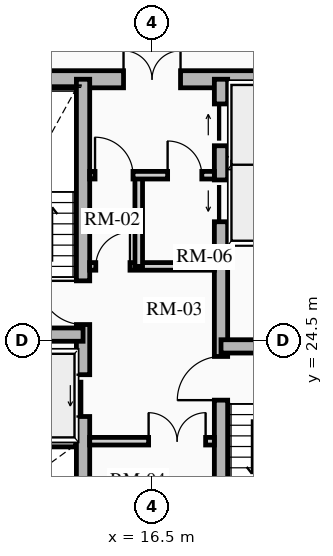
"""IFC4 building model, lengths in metres.
Left out: names, types, materials, properties, quantities, classifications, styles, units other than length and angle.
Written with IfcOpenShell. Run it as: python <this file> out.ifc"""

import sys

from ifc_helpers import new_model, si_unit, direction, frame, frame_2d, origin, place, context, subcontext, project, spatial, rectangle, extrude, source, transform, mapped, element, fill, save


model = new_model("IFC4")
c1 = context("Model", 3, precision=1e-05, world=origin(), true_north=direction((0.0, 1.0)))
c2 = subcontext(c1, "Body", "Model", "MODEL_VIEW")
j1 = project(units=[si_unit("LENGTHUNIT", "METRE"), si_unit("PLANEANGLEUNIT", "RADIAN")], contexts=[c1])
p1 = place(None, origin())
s1 = spatial("IfcSite", under=j1, at=p1, CompositionType="ELEMENT")
p2 = place(p1, origin())
s2 = spatial("IfcBuilding", under=s1, at=p2, CompositionType="ELEMENT")
p3 = place(p2, frame((0.0, 0.0, 113.8)))
s3 = spatial("IfcBuildingStorey", under=s2, at=p3, CompositionType="ELEMENT", Elevation=113.8)
p4 = place(p3, frame((11.15, 31.375, 0.0), z_axis=(0.0, 0.0, 1.0), x_axis=(1.0, 0.0, 0.0)))
e1 = element("IfcWall", 1, at=p4, inside=s3, PredefinedType="SHEAR", context=c2, shape_type="SweptSolid", body=[
    extrude(rectangle(XDim=10.7, YDim=0.45, at=frame_2d((5.35, 0.0))), origin(), (0.0, 0.0, 1.0), 2.91),
])
m1 = source(origin(), c2, "Body", "SweptSolid", [
    extrude(rectangle(XDim=1.5, YDim=2.02, at=frame_2d((0.75, 1.01))), frame((0.0, 0.235, 0.0), z_axis=(0.0, -1.0, 0.0), x_axis=(1.0, 0.0, 0.0)), (0.0, 0.0, 1.0), 0.47),
])
p5 = place(p4, frame((4.6, 0.0, 0.0)))
e2 = element("IfcOpeningElement", 2, at=p5, cuts=e1, PredefinedType="OPENING", context=c2, shape_type="MappedRepresentation", body=[
    mapped(m1, transform((0.0, 0.0, 0.0), x_axis=(1.0, 0.0, 0.0), y_axis=(0.0, 1.0, 0.0), z_axis=(0.0, 0.0, 1.0), scale=1.0)),
])
p6 = place(p3, frame((14.685, 17.625, 0.0), z_axis=(0.0, 0.0, 1.0), x_axis=(0.0, 1.0, 0.0)))
e3 = element("IfcWall", 3, at=p6, inside=s3, PredefinedType="SHEAR", context=c2, shape_type="SweptSolid", body=[
    extrude(rectangle(XDim=13.75, YDim=0.35, at=frame_2d((6.875, 0.0))), origin(), (0.0, 0.0, 1.0), 2.91),
])
m2 = source(origin(), c2, "Body", "SweptSolid", [
    extrude(rectangle(XDim=1.1, YDim=2.015, at=frame_2d((0.55, 1.007))), frame((0.0, 0.185, 0.0), z_axis=(0.0, -1.0, 0.0), x_axis=(1.0, 0.0, 0.0)), (0.0, 0.0, 1.0), 0.37),
])
p7 = place(p6, frame((4.875, 0.0, 0.0)))
e4 = element("IfcOpeningElement", 4, at=p7, cuts=e3, PredefinedType="OPENING", context=c2, shape_type="MappedRepresentation", body=[
    mapped(m2, transform((0.0, 0.0, 0.0), x_axis=(1.0, 0.0, 0.0), y_axis=(0.0, 1.0, 0.0), z_axis=(0.0, 0.0, 1.0), scale=1.0)),
])
m3 = source(origin(), c2, "Body", "SweptSolid", [
    extrude(rectangle(XDim=1.15, YDim=2.02, at=frame_2d((0.575, 1.01))), frame((0.0, 0.185, 0.0), z_axis=(0.0, -1.0, 0.0), x_axis=(1.0, 0.0, 0.0)), (0.0, 0.0, 1.0), 0.37),
])
p8 = place(p6, frame((7.295, 0.0, 0.0)))
e5 = element("IfcOpeningElement", 5, at=p8, cuts=e3, PredefinedType="OPENING", context=c2, shape_type="MappedRepresentation", body=[
    mapped(m3, transform((0.0, 0.0, 0.0), x_axis=(1.0, 0.0, 0.0), y_axis=(0.0, 1.0, 0.0), z_axis=(0.0, 0.0, 1.0), scale=1.0)),
])
p9 = place(p3, frame((18.315, 17.625, 0.0), z_axis=(0.0, 0.0, 1.0), x_axis=(0.0, 1.0, 0.0)))
e6 = element("IfcWall", 6, at=p9, inside=s3, PredefinedType="SHEAR", context=c2, shape_type="SweptSolid", body=[
    extrude(rectangle(XDim=13.75, YDim=0.35, at=frame_2d((6.875, 0.0))), origin(), (0.0, 0.0, 1.0), 2.91),
])
p10 = place(p9, frame((10.0, 0.0, 0.0)))
e7 = element("IfcOpeningElement", 7, at=p10, cuts=e6, PredefinedType="OPENING", context=c2, shape_type="MappedRepresentation", body=[
    mapped(m2, transform((0.0, 0.0, 0.0), x_axis=(1.0, 0.0, 0.0), y_axis=(0.0, 1.0, 0.0), z_axis=(0.0, 0.0, 1.0), scale=1.0)),
])
p11 = place(p9, frame((12.0, 0.0, 0.0)))
e8 = element("IfcOpeningElement", 8, at=p11, cuts=e6, PredefinedType="OPENING", context=c2, shape_type="MappedRepresentation", body=[
    mapped(m2, transform((0.0, 0.0, 0.0), x_axis=(1.0, 0.0, 0.0), y_axis=(0.0, 1.0, 0.0), z_axis=(0.0, 0.0, 1.0), scale=1.0)),
])
p12 = place(p9, frame((5.305, 0.0, 0.0)))
e9 = element("IfcOpeningElement", 9, at=p12, cuts=e6, PredefinedType="OPENING", context=c2, shape_type="MappedRepresentation", body=[
    mapped(m3, transform((0.0, 0.0, 0.0), x_axis=(1.0, 0.0, 0.0), y_axis=(0.0, 1.0, 0.0), z_axis=(0.0, 0.0, 1.0), scale=1.0)),
])
for number, where, z_axis, x_axis in (
    (10, (11.4, 24.655, 0.0), (0.0, 0.0, 1.0), (1.0, 0.0, 0.0)),
    (11, (18.315, 24.345, 0.0), (0.0, 0.0, 1.0), (1.0, 0.0, 0.0)),
):
    element("IfcWall", number, at=place(p3, frame(where, z_axis=z_axis, x_axis=x_axis)), inside=s3, PredefinedType="SHEAR", context=c2, shape_type="SweptSolid", body=[
        extrude(rectangle(XDim=3.285, YDim=0.35, at=frame_2d((1.643, 0.0))), origin(), (0.0, 0.0, 1.0), 2.91),
    ])
for number, where, z_axis, x_axis in (
    (12, (11.52, 21.8, 0.0), (0.0, 0.0, 1.0), (1.0, 0.0, 0.0)),
    (13, (18.51, 27.13, 0.0), (0.0, 0.0, 1.0), (1.0, 0.0, 0.0)),
    (14, (18.51, 29.175, 0.0), (0.0, 0.0, 1.0), (1.0, 0.0, 0.0)),
):
    element("IfcWall", number, at=place(p3, frame(where, z_axis=z_axis, x_axis=x_axis)), inside=s3, PredefinedType="SHEAR", context=c2, shape_type="SweptSolid", body=[
        extrude(rectangle(XDim=2.97, YDim=0.2, at=frame_2d((1.485, 0.0))), origin(), (0.0, 0.0, 1.0), 2.91),
    ])
p13 = place(p3, frame((14.86, 21.85, 0.0), z_axis=(0.0, 0.0, 1.0), x_axis=(1.0, 0.0, 0.0)))
e15 = element("IfcWall", 15, at=p13, inside=s3, PredefinedType="PARTITIONING", context=c2, shape_type="SweptSolid", body=[
    extrude(rectangle(XDim=3.28, YDim=0.2, at=frame_2d((1.64, 0.0))), origin(), (0.0, 0.0, 1.0), 2.655),
])
m4 = source(origin(), c2, "Body", "SweptSolid", [
    extrude(rectangle(XDim=1.5, YDim=2.02, at=frame_2d((0.75, 1.01))), frame((0.0, 0.11, 0.0), z_axis=(0.0, -1.0, 0.0), x_axis=(1.0, 0.0, 0.0)), (0.0, 0.0, 1.0), 0.22),
])
p14 = place(p13, frame((1.55, 0.0, 0.0)))
e16 = element("IfcOpeningElement", 16, at=p14, cuts=e15, PredefinedType="OPENING", context=c2, shape_type="MappedRepresentation", body=[
    mapped(m4, transform((0.0, 0.0, 0.0), x_axis=(1.0, 0.0, 0.0), y_axis=(0.0, 1.0, 0.0), z_axis=(0.0, 0.0, 1.0), scale=1.0)),
])
p15 = place(p3, frame((14.86, 26.45, 0.0), z_axis=(0.0, 0.0, 1.0), x_axis=(1.0, 0.0, 0.0)))
e17 = element("IfcWall", 17, at=p15, inside=s3, PredefinedType="PARTITIONING", context=c2, shape_type="SweptSolid", body=[
    extrude(rectangle(XDim=3.28, YDim=0.2, at=frame_2d((1.64, 0.0))), origin(), (0.0, 0.0, 1.0), 2.655),
])
m5 = source(origin(), c2, "Body", "SweptSolid", [
    extrude(rectangle(XDim=0.9, YDim=2.005, at=frame_2d((0.45, 1.002))), frame((0.0, 0.11, 0.0), z_axis=(0.0, -1.0, 0.0), x_axis=(1.0, 0.0, 0.0)), (0.0, 0.0, 1.0), 0.22),
])
p16 = place(p15, frame((0.16, 0.0, 0.0)))
e18 = element("IfcOpeningElement", 18, at=p16, cuts=e17, PredefinedType="OPENING", context=c2, shape_type="MappedRepresentation", body=[
    mapped(m5, transform((0.0, 0.0, 0.0), x_axis=(1.0, 0.0, 0.0), y_axis=(0.0, 1.0, 0.0), z_axis=(0.0, 0.0, 1.0), scale=1.0)),
])
p17 = place(p3, frame((16.15, 26.45, 0.0), z_axis=(0.0, 0.0, 1.0), x_axis=(0.0, 1.0, 0.0)))
e19 = element("IfcWall", 19, at=p17, inside=s3, PredefinedType="PARTITIONING", context=c2, shape_type="SweptSolid", body=[
    extrude(rectangle(XDim=2.4, YDim=0.2, at=frame_2d((1.2, 0.0))), origin(), (0.0, 0.0, 1.0), 2.655),
])
p18 = place(p3, frame((14.86, 28.85, 0.0), z_axis=(0.0, 0.0, 1.0), x_axis=(1.0, 0.0, 0.0)))
e20 = element("IfcWall", 20, at=p18, inside=s3, PredefinedType="PARTITIONING", context=c2, shape_type="SweptSolid", body=[
    extrude(rectangle(XDim=3.28, YDim=0.2, at=frame_2d((1.64, 0.0))), origin(), (0.0, 0.0, 1.0), 2.655),
])
m6 = source(origin(), c2, "Body", "SweptSolid", [
    extrude(rectangle(XDim=1.0, YDim=2.015, at=frame_2d((0.5, 1.007))), frame((0.0, 0.11, 0.0), z_axis=(0.0, -1.0, 0.0), x_axis=(1.0, 0.0, 0.0)), (0.0, 0.0, 1.0), 0.22),
])
p19 = place(p18, frame((0.14, 0.0, 0.0)))
e21 = element("IfcOpeningElement", 21, at=p19, cuts=e20, PredefinedType="OPENING", context=c2, shape_type="MappedRepresentation", body=[
    mapped(m6, transform((0.0, 0.0, 0.0), x_axis=(1.0, 0.0, 0.0), y_axis=(0.0, 1.0, 0.0), z_axis=(0.0, 0.0, 1.0), scale=1.0)),
])
p20 = place(p18, frame((2.05, 0.0, 0.0)))
e22 = element("IfcOpeningElement", 22, at=p20, cuts=e20, PredefinedType="OPENING", context=c2, shape_type="MappedRepresentation", body=[
    mapped(m5, transform((0.0, 0.0, 0.0), x_axis=(1.0, 0.0, 0.0), y_axis=(0.0, 1.0, 0.0), z_axis=(0.0, 0.0, 1.0), scale=1.0)),
])
m7 = source(origin(), c2, "Body", "SweptSolid", [
    extrude(rectangle(XDim=1.1, YDim=2.015, at=frame_2d((0.55, 1.007))), frame((0.0, 0.025, 0.0), z_axis=(0.0, -1.0, 0.0), x_axis=(1.0, 0.0, 0.0)), (0.0, 0.0, 1.0), 0.05),
])
p21 = place(p7, origin())
e23 = element("IfcDoor", 23, at=p21, inside=s3, OperationType="SLIDING_TO_LEFT", PredefinedType="DOOR", context=c2, shape_type="MappedRepresentation", body=[
    mapped(m7, transform((0.0, 0.0, 0.0), x_axis=(1.0, 0.0, 0.0), y_axis=(0.0, 1.0, 0.0), z_axis=(0.0, 0.0, 1.0), scale=1.0)),
])
fill(e4, e23)
p22 = place(p10, origin())
e24 = element("IfcDoor", 24, at=p22, inside=s3, OperationType="SLIDING_TO_LEFT", PredefinedType="DOOR", context=c2, shape_type="MappedRepresentation", body=[
    mapped(m7, transform((0.0, 0.0, 0.0), x_axis=(1.0, 0.0, 0.0), y_axis=(0.0, 1.0, 0.0), z_axis=(0.0, 0.0, 1.0), scale=1.0)),
])
fill(e7, e24)
p23 = place(p11, origin())
e25 = element("IfcDoor", 25, at=p23, inside=s3, OperationType="SLIDING_TO_RIGHT", PredefinedType="DOOR", context=c2, shape_type="MappedRepresentation", body=[
    mapped(m7, transform((0.0, 0.0, 0.0), x_axis=(1.0, 0.0, 0.0), y_axis=(0.0, 1.0, 0.0), z_axis=(0.0, 0.0, 1.0), scale=1.0)),
])
fill(e8, e25)
m8 = source(origin(), c2, "Body", "SweptSolid", [
    extrude(rectangle(XDim=1.15, YDim=2.02, at=frame_2d((0.575, 1.01))), frame((0.0, 0.025, 0.0), z_axis=(0.0, -1.0, 0.0), x_axis=(1.0, 0.0, 0.0)), (0.0, 0.0, 1.0), 0.05),
])
p24 = place(p8, origin())
e26 = element("IfcDoor", 26, at=p24, inside=s3, OperationType="SINGLE_SWING_RIGHT", PredefinedType="DOOR", context=c2, shape_type="MappedRepresentation", body=[
    mapped(m8, transform((0.0, 0.0, 0.0), x_axis=(1.0, 0.0, 0.0), y_axis=(0.0, 1.0, 0.0), z_axis=(0.0, 0.0, 1.0), scale=1.0)),
])
fill(e5, e26)
p25 = place(p12, origin())
e27 = element("IfcDoor", 27, at=p25, inside=s3, OperationType="SINGLE_SWING_LEFT", PredefinedType="DOOR", context=c2, shape_type="MappedRepresentation", body=[
    mapped(m8, transform((0.0, 0.0, 0.0), x_axis=(1.0, 0.0, 0.0), y_axis=(0.0, 1.0, 0.0), z_axis=(0.0, 0.0, 1.0), scale=1.0)),
])
fill(e9, e27)
m9 = source(origin(), c2, "Body", "SweptSolid", [
    extrude(rectangle(XDim=1.5, YDim=2.02, at=frame_2d((0.75, 1.01))), frame((0.0, 0.025, 0.0), z_axis=(0.0, -1.0, 0.0), x_axis=(1.0, 0.0, 0.0)), (0.0, 0.0, 1.0), 0.05),
])
p26 = place(p5, origin())
e28 = element("IfcDoor", 28, at=p26, inside=s3, OperationType="DOUBLE_DOOR_SINGLE_SWING", PredefinedType="DOOR", context=c2, shape_type="MappedRepresentation", body=[
    mapped(m9, transform((0.0, 0.0, 0.0), x_axis=(1.0, 0.0, 0.0), y_axis=(0.0, 1.0, 0.0), z_axis=(0.0, 0.0, 1.0), scale=1.0)),
])
fill(e2, e28)
p27 = place(p14, origin())
e29 = element("IfcDoor", 29, at=p27, inside=s3, OperationType="DOUBLE_DOOR_SINGLE_SWING", PredefinedType="DOOR", context=c2, shape_type="MappedRepresentation", body=[
    mapped(m9, transform((0.0, 0.0, 0.0), x_axis=(1.0, 0.0, 0.0), y_axis=(0.0, 1.0, 0.0), z_axis=(0.0, 0.0, 1.0), scale=1.0)),
])
fill(e16, e29)
m10 = source(origin(), c2, "Body", "SweptSolid", [
    extrude(rectangle(XDim=0.9, YDim=2.005, at=frame_2d((0.45, 1.002))), frame((0.0, 0.025, 0.0), z_axis=(0.0, -1.0, 0.0), x_axis=(1.0, 0.0, 0.0)), (0.0, 0.0, 1.0), 0.05),
])
p28 = place(p16, origin())
e30 = element("IfcDoor", 30, at=p28, inside=s3, OperationType="SINGLE_SWING_RIGHT", PredefinedType="DOOR", context=c2, shape_type="MappedRepresentation", body=[
    mapped(m10, transform((0.0, 0.0, 0.0), x_axis=(1.0, 0.0, 0.0), y_axis=(0.0, 1.0, 0.0), z_axis=(0.0, 0.0, 1.0), scale=1.0)),
])
fill(e18, e30)
m11 = source(origin(), c2, "Body", "SweptSolid", [
    extrude(rectangle(XDim=1.0, YDim=2.015, at=frame_2d((0.5, 1.007))), frame((0.0, 0.025, 0.0), z_axis=(0.0, -1.0, 0.0), x_axis=(1.0, 0.0, 0.0)), (0.0, 0.0, 1.0), 0.05),
])
p29 = place(p19, origin())
e31 = element("IfcDoor", 31, at=p29, inside=s3, OperationType="SINGLE_SWING_LEFT", PredefinedType="DOOR", context=c2, shape_type="MappedRepresentation", body=[
    mapped(m11, transform((0.0, 0.0, 0.0), x_axis=(1.0, 0.0, 0.0), y_axis=(0.0, 1.0, 0.0), z_axis=(0.0, 0.0, 1.0), scale=1.0)),
])
fill(e21, e31)
p30 = place(p20, origin())
e32 = element("IfcDoor", 32, at=p30, inside=s3, OperationType="SINGLE_SWING_LEFT", PredefinedType="DOOR", context=c2, shape_type="MappedRepresentation", body=[
    mapped(m10, transform((0.0, 0.0, 0.0), x_axis=(1.0, 0.0, 0.0), y_axis=(0.0, 1.0, 0.0), z_axis=(0.0, 0.0, 1.0), scale=1.0)),
])
fill(e22, e32)
save(model, sys.argv[1])
